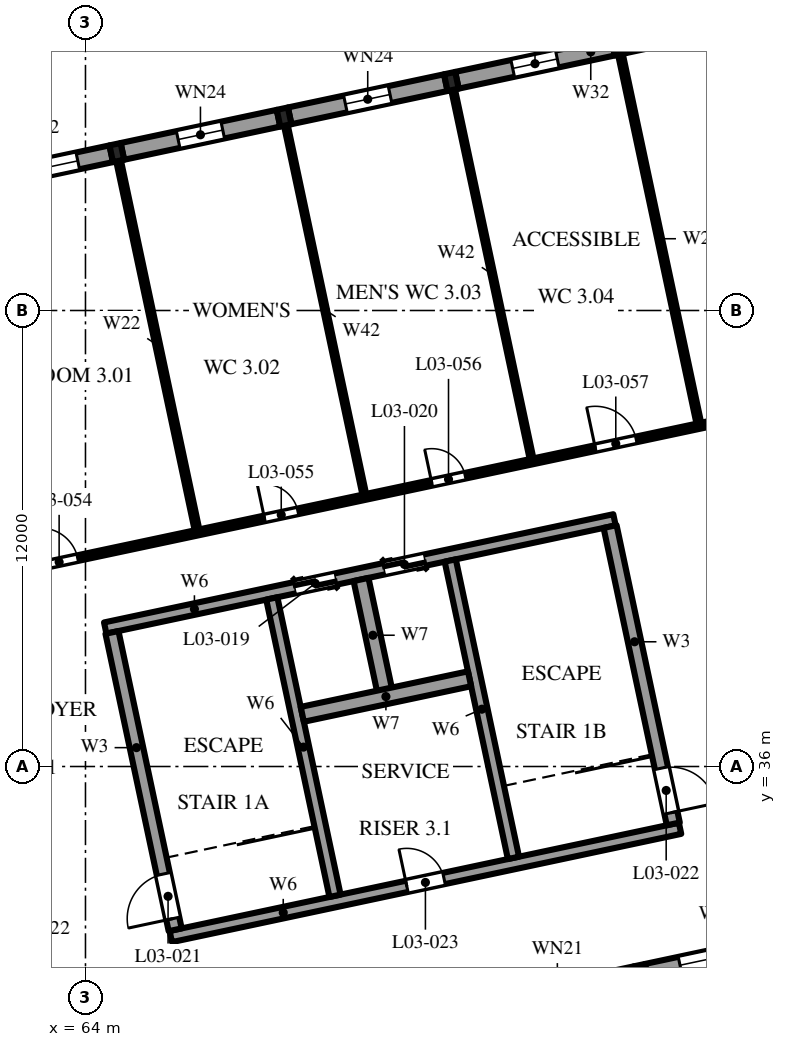
"""IFC4 building model, lengths in metres.
Left out: names, types, materials, properties, quantities, classifications, styles, units other than length and angle.
Written with IfcOpenShell. Run it as: python <this file> out.ifc"""

import sys

from ifc_helpers import new_model, si_unit, direction, frame, frame_2d, origin, origin_2d, place, context, subcontext, project, spatial, polyline, rectangle, i_section, outline, extrude, element, fill, save


model = new_model("IFC4")
c1 = context("Model", 3, precision=1e-05, world=origin(), true_north=direction((0.0, 1.0)))
c2 = subcontext(c1, "Body", "Model", "MODEL_VIEW")
j1 = project(units=[si_unit("LENGTHUNIT", "METRE"), si_unit("PLANEANGLEUNIT", "RADIAN")], contexts=[c1])
p1 = place(None, origin())
s1 = spatial("IfcSite", under=j1, at=p1, CompositionType="ELEMENT")
p2 = place(p1, origin())
s2 = spatial("IfcBuilding", under=s1, at=p2, CompositionType="ELEMENT")
p3 = place(p2, frame((0.0, 0.0, 16.8)))
s3 = spatial("IfcBuildingStorey", under=s2, at=p3, CompositionType="ELEMENT", Elevation=16.8)
for number, where, z_axis, x_axis in (
    (1, (78.618, 30.552, 0.0), (0.0, 0.0, 1.0), (0.978, 0.208, 0.0)),
    (2, (64.824, 52.156, 0.0), (0.0, 0.0, 1.0), (0.978, 0.208, 0.0)),
    (3, (69.226, 53.092, 0.0), (0.0, 0.0, 1.0), (0.978, 0.208, 0.0)),
    (4, (73.628, 54.027, 0.0), (0.0, 0.0, 1.0), (0.978, 0.208, 0.0)),
    (5, (78.03, 54.963, 0.0), (0.0, 0.0, 1.0), (0.978, 0.208, 0.0)),
):
    element("IfcColumn", number, at=place(p3, frame(where, z_axis=z_axis, x_axis=x_axis)), inside=s3, PredefinedType="COLUMN", context=c2, shape_type="SweptSolid", body=[
        extrude(i_section(OverallWidth=0.3, OverallDepth=0.45, WebThickness=0.014, FlangeThickness=0.026, FilletRadius=0.027, at=origin_2d()), origin(), (0.0, 0.0, 1.0), 4.8),
    ])
p4 = place(p3, frame((66.245, 31.525, 0.0), z_axis=(0.0, 0.0, 1.0), x_axis=(0.978147662755, 0.20791139903, 0.0)))
e6 = element("IfcWall", 6, at=p4, inside=s3, PredefinedType="SHEAR", context=c2, shape_type="SweptSolid", body=[
    extrude(outline(polyline([(0.0, 0.0), (13.7, 0.0), (13.7, 7.695), (0.0, 6.962), (0.0, 0.0)])), frame((0.0, 0.15, 0.0), z_axis=(0.0, -1.0, 0.0), x_axis=(1.0, 0.0, 0.0)), (0.0, 0.0, 1.0), 0.3),
])
p5 = place(p4, frame((6.35, 0.0, 0.0)))
e7 = element("IfcOpeningElement", 7, at=p5, cuts=e6, PredefinedType="OPENING", context=c2, shape_type="SweptSolid", body=[
    extrude(rectangle(XDim=1.0, YDim=2.1, at=frame_2d((0.5, 1.05))), frame((0.0, 0.16, 0.0), z_axis=(0.0, -1.0, 0.0), x_axis=(1.0, 0.0, 0.0)), (0.0, 0.0, 1.0), 0.32),
])
p6 = place(p3, frame((64.519, 39.644, 0.0), z_axis=(0.0, 0.0, 1.0), x_axis=(0.978147662755, 0.20791139903, 0.0)))
e8 = element("IfcWall", 8, at=p6, inside=s3, PredefinedType="SHEAR", context=c2, shape_type="SweptSolid", body=[
    extrude(outline(polyline([(0.0, 0.0), (13.7, 0.0), (13.7, 7.26), (0.0, 6.527), (0.0, 0.0)])), frame((0.0, 0.15, 0.0), z_axis=(0.0, -1.0, 0.0), x_axis=(1.0, 0.0, 0.0)), (0.0, 0.0, 1.0), 0.3),
])
p7 = place(p6, frame((5.1, 0.0, 0.0)))
e9 = element("IfcOpeningElement", 9, at=p7, cuts=e8, PredefinedType="OPENING", context=c2, shape_type="SweptSolid", body=[
    extrude(rectangle(XDim=1.1, YDim=2.1, at=frame_2d((0.55, 1.05))), frame((0.0, 0.16, 0.0), z_axis=(0.0, -1.0, 0.0), x_axis=(1.0, 0.0, 0.0)), (0.0, 0.0, 1.0), 0.32),
])
p8 = place(p6, frame((7.5, 0.0, 0.0)))
e10 = element("IfcOpeningElement", 10, at=p8, cuts=e8, PredefinedType="OPENING", context=c2, shape_type="SweptSolid", body=[
    extrude(rectangle(XDim=1.1, YDim=2.1, at=frame_2d((0.55, 1.05))), frame((0.0, 0.16, 0.0), z_axis=(0.0, -1.0, 0.0), x_axis=(1.0, 0.0, 0.0)), (0.0, 0.0, 1.0), 0.32),
])
p9 = place(p3, frame((66.36, 31.703, 0.0), z_axis=(0.0, 0.0, 1.0), x_axis=(-0.207915693476, 0.978146749934, 0.0)))
e11 = element("IfcWall", 11, at=p9, inside=s3, PredefinedType="SOLIDWALL", context=c2, shape_type="SweptSolid", body=[
    extrude(outline(polyline([(0.0, 0.0), (8.0, 0.0), (8.0, 6.542), (0.0, 6.962), (0.0, 0.0)])), frame((0.0, 0.175, 0.0), z_axis=(0.0, -1.0, 0.0), x_axis=(1.0, 0.0, 0.0)), (0.0, 0.0, 1.0), 0.35),
])
p10 = place(p9, frame((0.3, 0.0, 0.0)))
e12 = element("IfcOpeningElement", 12, at=p10, cuts=e11, PredefinedType="OPENING", context=c2, shape_type="SweptSolid", body=[
    extrude(rectangle(XDim=1.2, YDim=2.1, at=frame_2d((0.6, 1.05))), frame((0.0, 0.185, 0.0), z_axis=(0.0, -1.0, 0.0), x_axis=(1.0, 0.0, 0.0)), (0.0, 0.0, 1.0), 0.37),
])
p11 = place(p3, frame((79.468, 34.49, 0.0), z_axis=(0.0, 0.0, 1.0), x_axis=(-0.207915693476, 0.978146749934, 0.0)))
e13 = element("IfcWall", 13, at=p11, inside=s3, PredefinedType="SOLIDWALL", context=c2, shape_type="SweptSolid", body=[
    extrude(outline(polyline([(0.0, 0.0), (8.0, 0.0), (8.0, 7.26), (0.0, 7.679), (0.0, 0.0)])), frame((0.0, 0.175, 0.0), z_axis=(0.0, -1.0, 0.0), x_axis=(1.0, 0.0, 0.0)), (0.0, 0.0, 1.0), 0.35),
])
p12 = place(p11, frame((0.3, 0.0, 0.0)))
e14 = element("IfcOpeningElement", 14, at=p12, cuts=e13, PredefinedType="OPENING", context=c2, shape_type="SweptSolid", body=[
    extrude(rectangle(XDim=1.2, YDim=2.1, at=frame_2d((0.6, 1.05))), frame((0.0, 0.185, 0.0), z_axis=(0.0, -1.0, 0.0), x_axis=(1.0, 0.0, 0.0)), (0.0, 0.0, 1.0), 0.37),
])
p13 = place(p3, frame((70.566, 32.597, 0.0), z_axis=(0.0, 0.0, 1.0), x_axis=(-0.207915693476, 0.978146749934, 0.0)))
e15 = element("IfcWall", 15, at=p13, inside=s3, PredefinedType="SHEAR", context=c2, shape_type="SweptSolid", body=[
    extrude(outline(polyline([(0.0, 0.0), (8.0, 0.0), (8.0, 6.773), (0.0, 7.192), (0.0, 0.0)])), frame((0.0, 0.15, 0.0), z_axis=(0.0, -1.0, 0.0), x_axis=(1.0, 0.0, 0.0)), (0.0, 0.0, 1.0), 0.3),
])
p14 = place(p3, frame((75.261, 33.595, 0.0), z_axis=(0.0, 0.0, 1.0), x_axis=(-0.207915693476, 0.978146749934, 0.0)))
e16 = element("IfcWall", 16, at=p14, inside=s3, PredefinedType="SHEAR", context=c2, shape_type="SweptSolid", body=[
    extrude(outline(polyline([(0.0, 0.0), (8.0, 0.0), (8.0, 7.03), (0.0, 7.449), (0.0, 0.0)])), frame((0.0, 0.15, 0.0), z_axis=(0.0, -1.0, 0.0), x_axis=(1.0, 0.0, 0.0)), (0.0, 0.0, 1.0), 0.3),
])
p15 = place(p3, frame((71.874, 37.987, 0.0), z_axis=(0.0, 0.0, 1.0), x_axis=(-0.20783929028, 0.978162987143, 0.0)))
e17 = element("IfcWall", 17, at=p15, inside=s3, PredefinedType="SHEAR", context=c2, shape_type="SweptSolid", body=[
    extrude(outline(polyline([(0.0, 0.0), (3.0, 0.0), (3.0, 6.901), (0.0, 7.058), (0.0, 0.0)])), frame((0.0, 0.2, 0.0), z_axis=(0.0, -1.0, 0.0), x_axis=(1.0, 0.0, 0.0)), (0.0, 0.0, 1.0), 0.4),
])
p16 = place(p3, frame((69.705, 37.373, 0.0), z_axis=(0.0, 0.0, 1.0), x_axis=(0.978149611564, 0.20790223038, 0.0)))
e18 = element("IfcWall", 18, at=p16, inside=s3, PredefinedType="SHEAR", context=c2, shape_type="SweptSolid", body=[
    extrude(outline(polyline([(0.0, 0.0), (4.5, 0.0), (4.5, 7.187), (0.0, 6.946), (0.0, 0.0)])), frame((0.0, 0.2, 0.0), z_axis=(0.0, -1.0, 0.0), x_axis=(1.0, 0.0, 0.0)), (0.0, 0.0, 1.0), 0.4),
])
p17 = place(p3, frame((74.363, 29.647, 0.0), z_axis=(0.0, 0.0, 1.0), x_axis=(0.978143927149, 0.207928972925, 0.0)))
e19 = element("IfcWall", 19, at=p17, inside=s3, PredefinedType="SOLIDWALL", context=c2, shape_type="SweptSolid", body=[
    extrude(outline(polyline([(0.0, 0.0), (4.2, 0.0), (4.2, 9.075), (0.0, 8.85), (0.0, 0.0)])), frame((0.0, 0.225, 0.0), z_axis=(0.0, -1.0, 0.0), x_axis=(1.0, 0.0, 0.0)), (0.0, 0.0, 1.0), 0.45),
])
p18 = place(p17, frame((0.9, 0.0, 0.45)))
e20 = element("IfcOpeningElement", 20, at=p18, cuts=e19, PredefinedType="OPENING", context=c2, shape_type="SweptSolid", body=[
    extrude(rectangle(XDim=2.4, YDim=3.3, at=frame_2d((1.2, 1.65))), frame((0.0, 0.235, 0.0), z_axis=(0.0, -1.0, 0.0), x_axis=(1.0, 0.0, 0.0)), (0.0, 0.0, 1.0), 0.47),
])
p19 = place(p3, frame((78.764, 30.583, 0.0), z_axis=(0.0, 0.0, 1.0), x_axis=(0.978143927149, 0.207928972925, 0.0)))
e21 = element("IfcWall", 21, at=p19, inside=s3, PredefinedType="SOLIDWALL", context=c2, shape_type="SweptSolid", body=[
    extrude(outline(polyline([(0.0, 0.0), (4.2, 0.0), (4.2, 9.316), (0.0, 9.091), (0.0, 0.0)])), frame((0.0, 0.225, 0.0), z_axis=(0.0, -1.0, 0.0), x_axis=(1.0, 0.0, 0.0)), (0.0, 0.0, 1.0), 0.45),
])
p20 = place(p19, frame((0.9, 0.0, 0.45)))
e22 = element("IfcOpeningElement", 22, at=p20, cuts=e21, PredefinedType="OPENING", context=c2, shape_type="SweptSolid", body=[
    extrude(rectangle(XDim=2.4, YDim=3.3, at=frame_2d((1.2, 1.65))), frame((0.0, 0.235, 0.0), z_axis=(0.0, -1.0, 0.0), x_axis=(1.0, 0.0, 0.0)), (0.0, 0.0, 1.0), 0.47),
])
p21 = place(p3, frame((60.57, 51.251, 0.0), z_axis=(0.0, 0.0, 1.0), x_axis=(0.978143927149, 0.207928972925, 0.0)))
e23 = element("IfcWall", 23, at=p21, inside=s3, PredefinedType="SOLIDWALL", context=c2, shape_type="SweptSolid", body=[
    extrude(outline(polyline([(0.0, 0.0), (4.2, 0.0), (4.2, 7.336), (0.0, 7.111), (0.0, 0.0)])), frame((0.0, 0.225, 0.0), z_axis=(0.0, -1.0, 0.0), x_axis=(1.0, 0.0, 0.0)), (0.0, 0.0, 1.0), 0.45),
])
p22 = place(p21, frame((0.9, 0.0, 0.9)))
e24 = element("IfcOpeningElement", 24, at=p22, cuts=e23, PredefinedType="OPENING", context=c2, shape_type="SweptSolid", body=[
    extrude(rectangle(XDim=2.4, YDim=2.4, at=frame_2d((1.2, 1.2))), frame((0.0, 0.235, 0.0), z_axis=(0.0, -1.0, 0.0), x_axis=(1.0, 0.0, 0.0)), (0.0, 0.0, 1.0), 0.47),
])
p23 = place(p3, frame((64.971, 52.187, 0.0), z_axis=(0.0, 0.0, 1.0), x_axis=(0.978155748334, 0.207873355681, 0.0)))
e25 = element("IfcWall", 25, at=p23, inside=s3, PredefinedType="SOLIDWALL", context=c2, shape_type="SweptSolid", body=[
    extrude(outline(polyline([(0.0, 0.0), (4.2, 0.0), (4.2, 7.576), (0.0, 7.352), (0.0, 0.0)])), frame((0.0, 0.225, 0.0), z_axis=(0.0, -1.0, 0.0), x_axis=(1.0, 0.0, 0.0)), (0.0, 0.0, 1.0), 0.45),
])
p24 = place(p23, frame((1.5, 0.0, 1.5)))
e26 = element("IfcOpeningElement", 26, at=p24, cuts=e25, PredefinedType="OPENING", context=c2, shape_type="SweptSolid", body=[
    extrude(rectangle(XDim=1.2, YDim=1.2, at=frame_2d((0.6, 0.6))), frame((0.0, 0.235, 0.0), z_axis=(0.0, -1.0, 0.0), x_axis=(1.0, 0.0, 0.0)), (0.0, 0.0, 1.0), 0.47),
])
p25 = place(p3, frame((69.373, 53.123, 0.0), z_axis=(0.0, 0.0, 1.0), x_axis=(0.978143927149, 0.207928972925, 0.0)))
e27 = element("IfcWall", 27, at=p25, inside=s3, PredefinedType="SOLIDWALL", context=c2, shape_type="SweptSolid", body=[
    extrude(outline(polyline([(0.0, 0.0), (4.2, 0.0), (4.2, 7.817), (0.0, 7.593), (0.0, 0.0)])), frame((0.0, 0.225, 0.0), z_axis=(0.0, -1.0, 0.0), x_axis=(1.0, 0.0, 0.0)), (0.0, 0.0, 1.0), 0.45),
])
p26 = place(p25, frame((1.5, 0.0, 1.5)))
e28 = element("IfcOpeningElement", 28, at=p26, cuts=e27, PredefinedType="OPENING", context=c2, shape_type="SweptSolid", body=[
    extrude(rectangle(XDim=1.2, YDim=1.2, at=frame_2d((0.6, 0.6))), frame((0.0, 0.235, 0.0), z_axis=(0.0, -1.0, 0.0), x_axis=(1.0, 0.0, 0.0)), (0.0, 0.0, 1.0), 0.47),
])
p27 = place(p3, frame((73.774, 54.058, 0.0), z_axis=(0.0, 0.0, 1.0), x_axis=(0.978146440129, 0.207917150959, 0.0)))
e29 = element("IfcWall", 29, at=p27, inside=s3, PredefinedType="SOLIDWALL", context=c2, shape_type="SweptSolid", body=[
    extrude(outline(polyline([(0.0, 0.0), (4.2, 0.0), (4.2, 8.058), (0.0, 7.833), (0.0, 0.0)])), frame((0.0, 0.225, 0.0), z_axis=(0.0, -1.0, 0.0), x_axis=(1.0, 0.0, 0.0)), (0.0, 0.0, 1.0), 0.45),
])
p28 = place(p27, frame((1.5, 0.0, 1.5)))
e30 = element("IfcOpeningElement", 30, at=p28, cuts=e29, PredefinedType="OPENING", context=c2, shape_type="SweptSolid", body=[
    extrude(rectangle(XDim=1.2, YDim=1.2, at=frame_2d((0.6, 0.6))), frame((0.0, 0.235, 0.0), z_axis=(0.0, -1.0, 0.0), x_axis=(1.0, 0.0, 0.0)), (0.0, 0.0, 1.0), 0.47),
])
p29 = place(p3, frame((78.176, 54.994, 0.0), z_axis=(0.0, 0.0, 1.0), x_axis=(0.978143927149, 0.207928972925, 0.0)))
e31 = element("IfcWall", 31, at=p29, inside=s3, PredefinedType="SOLIDWALL", context=c2, shape_type="SweptSolid", body=[
    extrude(outline(polyline([(0.0, 0.0), (4.2, 0.0), (4.2, 8.299), (0.0, 8.074), (0.0, 0.0)])), frame((0.0, 0.225, 0.0), z_axis=(0.0, -1.0, 0.0), x_axis=(1.0, 0.0, 0.0)), (0.0, 0.0, 1.0), 0.45),
])
p30 = place(p29, frame((0.9, 0.0, 0.9)))
e32 = element("IfcOpeningElement", 32, at=p30, cuts=e31, PredefinedType="OPENING", context=c2, shape_type="SweptSolid", body=[
    extrude(rectangle(XDim=2.4, YDim=2.4, at=frame_2d((1.2, 1.2))), frame((0.0, 0.235, 0.0), z_axis=(0.0, -1.0, 0.0), x_axis=(1.0, 0.0, 0.0)), (0.0, 0.0, 1.0), 0.47),
])
p31 = place(p3, frame((59.663, 40.605, 0.0), z_axis=(0.0, 0.0, 1.0), x_axis=(0.978147466509, 0.207912322295, 0.0)))
e33 = element("IfcWall", 33, at=p31, inside=s3, PredefinedType="PARTITIONING", context=c2, shape_type="SweptSolid", body=[
    extrude(outline(polyline([(0.0, 0.0), (34.45, 0.0), (34.45, 7.224), (0.0, 5.381), (0.0, 0.0)])), frame((0.0, 0.075, 0.0), z_axis=(0.0, -1.0, 0.0), x_axis=(1.0, 0.0, 0.0)), (0.0, 0.0, 1.0), 0.15),
])
p32 = place(p31, frame((3.225, 0.0, 0.0)))
e34 = element("IfcOpeningElement", 34, at=p32, cuts=e33, PredefinedType="OPENING", context=c2, shape_type="SweptSolid", body=[
    extrude(rectangle(XDim=1.0, YDim=2.1, at=frame_2d((0.5, 1.05))), frame((0.0, 0.085, 0.0), z_axis=(0.0, -1.0, 0.0), x_axis=(1.0, 0.0, 0.0)), (0.0, 0.0, 1.0), 0.17),
])
p33 = place(p31, frame((9.25, 0.0, 0.0)))
e35 = element("IfcOpeningElement", 35, at=p33, cuts=e33, PredefinedType="OPENING", context=c2, shape_type="SweptSolid", body=[
    extrude(rectangle(XDim=0.9, YDim=2.1, at=frame_2d((0.45, 1.05))), frame((0.0, 0.085, 0.0), z_axis=(0.0, -1.0, 0.0), x_axis=(1.0, 0.0, 0.0)), (0.0, 0.0, 1.0), 0.17),
])
p34 = place(p31, frame((13.75, 0.0, 0.0)))
e36 = element("IfcOpeningElement", 36, at=p34, cuts=e33, PredefinedType="OPENING", context=c2, shape_type="SweptSolid", body=[
    extrude(rectangle(XDim=0.9, YDim=2.1, at=frame_2d((0.45, 1.05))), frame((0.0, 0.085, 0.0), z_axis=(0.0, -1.0, 0.0), x_axis=(1.0, 0.0, 0.0)), (0.0, 0.0, 1.0), 0.17),
])
p35 = place(p31, frame((18.15, 0.0, 0.0)))
e37 = element("IfcOpeningElement", 37, at=p35, cuts=e33, PredefinedType="OPENING", context=c2, shape_type="SweptSolid", body=[
    extrude(rectangle(XDim=1.1, YDim=2.1, at=frame_2d((0.55, 1.05))), frame((0.0, 0.085, 0.0), z_axis=(0.0, -1.0, 0.0), x_axis=(1.0, 0.0, 0.0)), (0.0, 0.0, 1.0), 0.17),
])
p36 = place(p31, frame((26.8, 0.0, 0.0)))
e38 = element("IfcOpeningElement", 38, at=p36, cuts=e33, PredefinedType="OPENING", context=c2, shape_type="SweptSolid", body=[
    extrude(rectangle(XDim=1.8, YDim=2.1, at=frame_2d((0.9, 1.05))), frame((0.0, 0.085, 0.0), z_axis=(0.0, -1.0, 0.0), x_axis=(1.0, 0.0, 0.0)), (0.0, 0.0, 1.0), 0.17),
])
p37 = place(p3, frame((64.871, 51.936, 0.0), z_axis=(0.0, 0.0, 1.0), x_axis=(0.20790935802, -0.978148096582, 0.0)))
e39 = element("IfcWall", 39, at=p37, inside=s3, PredefinedType="PARTITIONING", context=c2, shape_type="SweptSolid", body=[
    extrude(outline(polyline([(0.0, 0.0), (9.925, 0.0), (9.925, 5.551), (0.0, 5.256), (0.0, 0.0)])), frame((0.0, 0.062, 0.0), z_axis=(0.0, -1.0, 0.0), x_axis=(1.0, 0.0, 0.0)), (0.0, 0.0, 1.0), 0.125),
])
p38 = place(p3, frame((69.273, 52.872, 0.0), z_axis=(0.0, 0.0, 1.0), x_axis=(0.207904355568, -0.978149159861, 0.0)))
e40 = element("IfcWall", 40, at=p38, inside=s3, PredefinedType="PARTITIONING", context=c2, shape_type="SweptSolid", body=[
    extrude(outline(polyline([(0.0, 0.0), (9.925, 0.0), (9.925, 5.792), (0.0, 5.496), (0.0, 0.0)])), frame((0.0, 0.05, 0.0), z_axis=(0.0, -1.0, 0.0), x_axis=(1.0, 0.0, 0.0)), (0.0, 0.0, 1.0), 0.1),
])
p39 = place(p3, frame((73.675, 53.807, 0.0), z_axis=(0.0, 0.0, 1.0), x_axis=(0.207904355568, -0.978149159861, 0.0)))
e41 = element("IfcWall", 41, at=p39, inside=s3, PredefinedType="PARTITIONING", context=c2, shape_type="SweptSolid", body=[
    extrude(outline(polyline([(0.0, 0.0), (9.925, 0.0), (9.925, 6.032), (0.0, 5.737), (0.0, 0.0)])), frame((0.0, 0.05, 0.0), z_axis=(0.0, -1.0, 0.0), x_axis=(1.0, 0.0, 0.0)), (0.0, 0.0, 1.0), 0.1),
])
p40 = place(p3, frame((78.076, 54.743, 0.0), z_axis=(0.0, 0.0, 1.0), x_axis=(0.20790935802, -0.978148096582, 0.0)))
e42 = element("IfcWall", 42, at=p40, inside=s3, PredefinedType="PARTITIONING", context=c2, shape_type="SweptSolid", body=[
    extrude(outline(polyline([(0.0, 0.0), (9.925, 0.0), (9.925, 5.973), (0.0, 5.973), (0.0, 0.0)])), frame((0.0, 0.062, 0.0), z_axis=(0.0, -1.0, 0.0), x_axis=(1.0, 0.0, 0.0)), (0.0, 0.0, 1.0), 0.125),
])
p41 = place(p20, origin())
e43 = element("IfcWindow", 43, at=p41, inside=s3, PartitioningType="DOUBLE_PANEL_VERTICAL", PredefinedType="WINDOW", context=c2, shape_type="SweptSolid", body=[
    extrude(rectangle(XDim=2.4, YDim=3.3, at=frame_2d((1.2, 1.65))), frame((0.0, 0.03, 0.0), z_axis=(0.0, -1.0, 0.0), x_axis=(1.0, 0.0, 0.0)), (0.0, 0.0, 1.0), 0.06),
])
fill(e22, e43)
p42 = place(p22, origin())
e44 = element("IfcWindow", 44, at=p42, inside=s3, PartitioningType="SINGLE_PANEL", PredefinedType="WINDOW", context=c2, shape_type="SweptSolid", body=[
    extrude(rectangle(XDim=2.4, YDim=2.4, at=frame_2d((1.2, 1.2))), frame((0.0, 0.03, 0.0), z_axis=(0.0, -1.0, 0.0), x_axis=(1.0, 0.0, 0.0)), (0.0, 0.0, 1.0), 0.06),
])
fill(e24, e44)
p43 = place(p24, origin())
e45 = element("IfcWindow", 45, at=p43, inside=s3, PartitioningType="SINGLE_PANEL", PredefinedType="WINDOW", context=c2, shape_type="SweptSolid", body=[
    extrude(rectangle(XDim=1.2, YDim=1.2, at=frame_2d((0.6, 0.6))), frame((0.0, 0.03, 0.0), z_axis=(0.0, -1.0, 0.0), x_axis=(1.0, 0.0, 0.0)), (0.0, 0.0, 1.0), 0.06),
])
fill(e26, e45)
p44 = place(p26, origin())
e46 = element("IfcWindow", 46, at=p44, inside=s3, PartitioningType="SINGLE_PANEL", PredefinedType="WINDOW", context=c2, shape_type="SweptSolid", body=[
    extrude(rectangle(XDim=1.2, YDim=1.2, at=frame_2d((0.6, 0.6))), frame((0.0, 0.03, 0.0), z_axis=(0.0, -1.0, 0.0), x_axis=(1.0, 0.0, 0.0)), (0.0, 0.0, 1.0), 0.06),
])
fill(e28, e46)
p45 = place(p28, origin())
e47 = element("IfcWindow", 47, at=p45, inside=s3, PartitioningType="SINGLE_PANEL", PredefinedType="WINDOW", context=c2, shape_type="SweptSolid", body=[
    extrude(rectangle(XDim=1.2, YDim=1.2, at=frame_2d((0.6, 0.6))), frame((0.0, 0.03, 0.0), z_axis=(0.0, -1.0, 0.0), x_axis=(1.0, 0.0, 0.0)), (0.0, 0.0, 1.0), 0.06),
])
fill(e30, e47)
p46 = place(p7, origin())
e48 = element("IfcDoor", 48, at=p46, inside=s3, OperationType="DOUBLE_DOOR_SLIDING", PredefinedType="DOOR", context=c2, shape_type="SweptSolid", body=[
    extrude(rectangle(XDim=1.1, YDim=2.1, at=frame_2d((0.55, 1.05))), frame((0.0, 0.025, 0.0), z_axis=(0.0, -1.0, 0.0), x_axis=(1.0, 0.0, 0.0)), (0.0, 0.0, 1.0), 0.05),
])
fill(e9, e48)
p47 = place(p8, origin())
e49 = element("IfcDoor", 49, at=p47, inside=s3, OperationType="DOUBLE_DOOR_SLIDING", PredefinedType="DOOR", context=c2, shape_type="SweptSolid", body=[
    extrude(rectangle(XDim=1.1, YDim=2.1, at=frame_2d((0.55, 1.05))), frame((0.0, 0.025, 0.0), z_axis=(0.0, -1.0, 0.0), x_axis=(1.0, 0.0, 0.0)), (0.0, 0.0, 1.0), 0.05),
])
fill(e10, e49)
p48 = place(p10, origin())
e50 = element("IfcDoor", 50, at=p48, inside=s3, OperationType="SINGLE_SWING_LEFT", PredefinedType="DOOR", context=c2, shape_type="SweptSolid", body=[
    extrude(rectangle(XDim=1.2, YDim=2.1, at=frame_2d((0.6, 1.05))), frame((0.0, 0.025, 0.0), z_axis=(0.0, -1.0, 0.0), x_axis=(1.0, 0.0, 0.0)), (0.0, 0.0, 1.0), 0.05),
])
fill(e12, e50)
p49 = place(p12, frame((1.2, 0.0, 0.0), z_axis=(0.0, 0.0, 1.0), x_axis=(-1.0, 0.0, 0.0)))
e51 = element("IfcDoor", 51, at=p49, inside=s3, OperationType="SINGLE_SWING_LEFT", PredefinedType="DOOR", context=c2, shape_type="SweptSolid", body=[
    extrude(rectangle(XDim=1.2, YDim=2.1, at=frame_2d((0.6, 1.05))), frame((0.0, 0.025, 0.0), z_axis=(0.0, -1.0, 0.0), x_axis=(1.0, 0.0, 0.0)), (0.0, 0.0, 1.0), 0.05),
])
fill(e14, e51)
p50 = place(p5, origin())
e52 = element("IfcDoor", 52, at=p50, inside=s3, OperationType="SINGLE_SWING_RIGHT", PredefinedType="DOOR", context=c2, shape_type="SweptSolid", body=[
    extrude(rectangle(XDim=1.0, YDim=2.1, at=frame_2d((0.5, 1.05))), frame((0.0, 0.025, 0.0), z_axis=(0.0, -1.0, 0.0), x_axis=(1.0, 0.0, 0.0)), (0.0, 0.0, 1.0), 0.05),
])
fill(e7, e52)
p51 = place(p32, origin())
e53 = element("IfcDoor", 53, at=p51, inside=s3, OperationType="SINGLE_SWING_RIGHT", PredefinedType="DOOR", context=c2, shape_type="SweptSolid", body=[
    extrude(rectangle(XDim=1.0, YDim=2.1, at=frame_2d((0.5, 1.05))), frame((0.0, 0.025, 0.0), z_axis=(0.0, -1.0, 0.0), x_axis=(1.0, 0.0, 0.0)), (0.0, 0.0, 1.0), 0.05),
])
fill(e34, e53)
p52 = place(p33, origin())
e54 = element("IfcDoor", 54, at=p52, inside=s3, OperationType="SINGLE_SWING_LEFT", PredefinedType="DOOR", context=c2, shape_type="SweptSolid", body=[
    extrude(rectangle(XDim=0.9, YDim=2.1, at=frame_2d((0.45, 1.05))), frame((0.0, 0.025, 0.0), z_axis=(0.0, -1.0, 0.0), x_axis=(1.0, 0.0, 0.0)), (0.0, 0.0, 1.0), 0.05),
])
fill(e35, e54)
p53 = place(p34, origin())
e55 = element("IfcDoor", 55, at=p53, inside=s3, OperationType="SINGLE_SWING_RIGHT", PredefinedType="DOOR", context=c2, shape_type="SweptSolid", body=[
    extrude(rectangle(XDim=0.9, YDim=2.1, at=frame_2d((0.45, 1.05))), frame((0.0, 0.025, 0.0), z_axis=(0.0, -1.0, 0.0), x_axis=(1.0, 0.0, 0.0)), (0.0, 0.0, 1.0), 0.05),
])
fill(e36, e55)
p54 = place(p35, origin())
e56 = element("IfcDoor", 56, at=p54, inside=s3, OperationType="SINGLE_SWING_LEFT", PredefinedType="DOOR", context=c2, shape_type="SweptSolid", body=[
    extrude(rectangle(XDim=1.1, YDim=2.1, at=frame_2d((0.55, 1.05))), frame((0.0, 0.025, 0.0), z_axis=(0.0, -1.0, 0.0), x_axis=(1.0, 0.0, 0.0)), (0.0, 0.0, 1.0), 0.05),
])
fill(e37, e56)
save(model, sys.argv[1])
